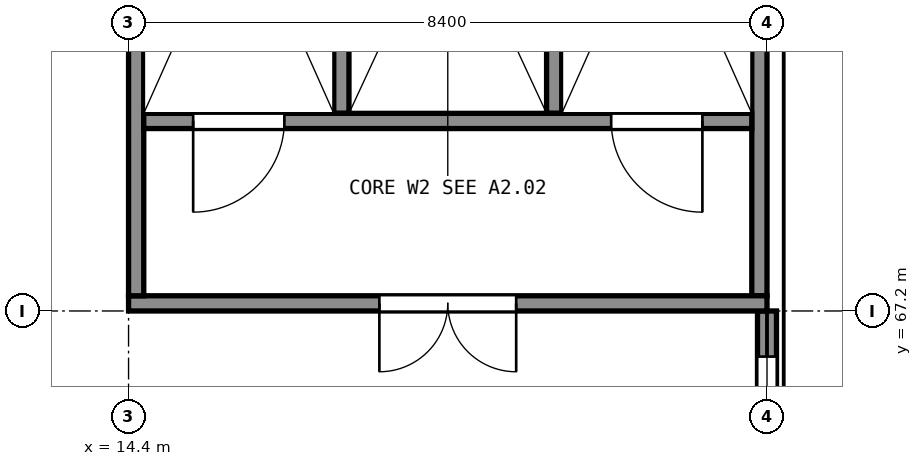
"""IFC4 building model, lengths in metres.
Left out: names, types, materials, properties, quantities, classifications, styles, units other than length and angle.
Written with IfcOpenShell. Run it as: python <this file> out.ifc"""

import sys

from ifc_helpers import new_model, si_unit, direction, frame, frame_2d, origin, place, context, subcontext, project, spatial, rectangle, extrude, element, fill, save


model = new_model("IFC4")
c1 = context("Model", 3, precision=1e-05, world=origin(), true_north=direction((0.0, 1.0)))
c2 = subcontext(c1, "Body", "Model", "MODEL_VIEW")
j1 = project(units=[si_unit("LENGTHUNIT", "METRE"), si_unit("PLANEANGLEUNIT", "RADIAN")], contexts=[c1])
p1 = place(None, origin())
s1 = spatial("IfcSite", under=j1, at=p1, CompositionType="ELEMENT")
p2 = place(p1, origin())
s2 = spatial("IfcBuilding", under=s1, at=p2, CompositionType="ELEMENT")
p3 = place(p2, frame((0.0, 0.0, 5.5)))
s3 = spatial("IfcBuildingStorey", under=s2, at=p3, CompositionType="ELEMENT", Elevation=5.5)
p4 = place(p3, frame((14.4, 67.3, 0.0), z_axis=(0.0, 0.0, 1.0), x_axis=(1.0, 0.0, 0.0)))
e1 = element("IfcWall", 1, at=p4, inside=s3, PredefinedType="SHEAR", context=c2, shape_type="SweptSolid", body=[
    extrude(rectangle(XDim=8.4, YDim=0.2, at=frame_2d((4.2, 0.0))), origin(), (0.0, 0.0, 1.0), 5.0),
])
p5 = place(p4, frame((3.3, 0.0, 0.0)))
e2 = element("IfcOpeningElement", 2, at=p5, cuts=e1, PredefinedType="OPENING", context=c2, shape_type="SweptSolid", body=[
    extrude(rectangle(XDim=1.8, YDim=2.1, at=frame_2d((0.9, 1.05))), frame((0.0, 0.11, 0.0), z_axis=(0.0, -1.0, 0.0), x_axis=(1.0, 0.0, 0.0)), (0.0, 0.0, 1.0), 0.22),
])
for number, where, z_axis, x_axis in (
    (3, (14.5, 67.4, 0.0), (0.0, 0.0, 1.0), (0.0, 1.0, 0.0)),
    (4, (22.7, 67.4, 0.0), (0.0, 0.0, 1.0), (0.0, 1.0, 0.0)),
):
    element("IfcWall", number, at=place(p3, frame(where, z_axis=z_axis, x_axis=x_axis)), inside=s3, PredefinedType="SHEAR", context=c2, shape_type="SweptSolid", body=[
        extrude(rectangle(XDim=8.0, YDim=0.2, at=frame_2d((4.0, 0.0))), origin(), (0.0, 0.0, 1.0), 5.0),
    ])
p6 = place(p3, frame((14.6, 69.7, 0.0), z_axis=(0.0, 0.0, 1.0), x_axis=(1.0, 0.0, 0.0)))
e5 = element("IfcWall", 5, at=p6, inside=s3, PredefinedType="SHEAR", context=c2, shape_type="SweptSolid", body=[
    extrude(rectangle(XDim=8.0, YDim=0.2, at=frame_2d((4.0, 0.0))), origin(), (0.0, 0.0, 1.0), 5.0),
])
p7 = place(p6, frame((0.65, 0.0, 0.0)))
e6 = element("IfcOpeningElement", 6, at=p7, cuts=e5, PredefinedType="OPENING", context=c2, shape_type="SweptSolid", body=[
    extrude(rectangle(XDim=1.2, YDim=2.1, at=frame_2d((0.6, 1.05))), frame((0.0, 0.11, 0.0), z_axis=(0.0, -1.0, 0.0), x_axis=(1.0, 0.0, 0.0)), (0.0, 0.0, 1.0), 0.22),
])
p8 = place(p6, frame((6.15, 0.0, 0.0)))
e7 = element("IfcOpeningElement", 7, at=p8, cuts=e5, PredefinedType="OPENING", context=c2, shape_type="SweptSolid", body=[
    extrude(rectangle(XDim=1.2, YDim=2.1, at=frame_2d((0.6, 1.05))), frame((0.0, 0.11, 0.0), z_axis=(0.0, -1.0, 0.0), x_axis=(1.0, 0.0, 0.0)), (0.0, 0.0, 1.0), 0.22),
])
for number, where, z_axis, x_axis in (
    (8, (17.2, 69.8, 0.0), (0.0, 0.0, 1.0), (0.0, 1.0, 0.0)),
    (9, (20.0, 69.8, 0.0), (0.0, 0.0, 1.0), (0.0, 1.0, 0.0)),
):
    element("IfcWall", number, at=place(p3, frame(where, z_axis=z_axis, x_axis=x_axis)), inside=s3, PredefinedType="SHEAR", context=c2, shape_type="SweptSolid", body=[
        extrude(rectangle(XDim=5.6, YDim=0.2, at=frame_2d((2.8, 0.0))), origin(), (0.0, 0.0, 1.0), 5.0),
    ])
p9 = place(p3, frame((22.8, 59.2, 0.0), z_axis=(0.0, 0.0, 1.0), x_axis=(0.0, 1.0, 0.0)))
e10 = element("IfcWall", 10, at=p9, inside=s3, PredefinedType="SOLIDWALL", context=c2, shape_type="SweptSolid", body=[
    extrude(rectangle(XDim=8.0, YDim=0.25, at=frame_2d((4.0, 0.0))), origin(), (0.0, 0.0, 1.0), 3.94),
])
p10 = place(p9, frame((0.6, 0.0, 0.9)))
e11 = element("IfcOpeningElement", 11, at=p10, cuts=e10, PredefinedType="OPENING", context=c2, shape_type="SweptSolid", body=[
    extrude(rectangle(XDim=1.2, YDim=2.1, at=frame_2d((0.6, 1.05))), frame((0.0, 0.135, 0.0), z_axis=(0.0, -1.0, 0.0), x_axis=(1.0, 0.0, 0.0)), (0.0, 0.0, 1.0), 0.27),
])
p11 = place(p9, frame((3.95, 0.0, 0.9)))
e12 = element("IfcOpeningElement", 12, at=p11, cuts=e10, PredefinedType="OPENING", context=c2, shape_type="SweptSolid", body=[
    extrude(rectangle(XDim=1.2, YDim=2.1, at=frame_2d((0.6, 1.05))), frame((0.0, 0.135, 0.0), z_axis=(0.0, -1.0, 0.0), x_axis=(1.0, 0.0, 0.0)), (0.0, 0.0, 1.0), 0.27),
])
p12 = place(p9, frame((6.2, 0.0, 0.9)))
e13 = element("IfcOpeningElement", 13, at=p12, cuts=e10, PredefinedType="OPENING", context=c2, shape_type="SweptSolid", body=[
    extrude(rectangle(XDim=1.2, YDim=2.1, at=frame_2d((0.6, 1.05))), frame((0.0, 0.135, 0.0), z_axis=(0.0, -1.0, 0.0), x_axis=(1.0, 0.0, 0.0)), (0.0, 0.0, 1.0), 0.27),
])
p13 = place(p12, origin())
e14 = element("IfcWindow", 14, at=p13, inside=s3, PartitioningType="SINGLE_PANEL", PredefinedType="WINDOW", context=c2, shape_type="SweptSolid", body=[
    extrude(rectangle(XDim=1.2, YDim=2.1, at=frame_2d((0.6, 1.05))), frame((0.0, 0.105, 0.0), z_axis=(0.0, -1.0, 0.0), x_axis=(1.0, 0.0, 0.0)), (0.0, 0.0, 1.0), 0.06),
])
fill(e13, e14)
p14 = place(p5, origin())
e15 = element("IfcDoor", 15, at=p14, inside=s3, OperationType="DOUBLE_DOOR_SINGLE_SWING", PredefinedType="DOOR", context=c2, shape_type="SweptSolid", body=[
    extrude(rectangle(XDim=1.8, YDim=2.1, at=frame_2d((0.9, 1.05))), frame((0.0, 0.025, 0.0), z_axis=(0.0, -1.0, 0.0), x_axis=(1.0, 0.0, 0.0)), (0.0, 0.0, 1.0), 0.05),
])
fill(e2, e15)
p15 = place(p7, origin())
e16 = element("IfcDoor", 16, at=p15, inside=s3, OperationType="SINGLE_SWING_LEFT", PredefinedType="DOOR", context=c2, shape_type="SweptSolid", body=[
    extrude(rectangle(XDim=1.2, YDim=2.1, at=frame_2d((0.6, 1.05))), frame((0.0, 0.025, 0.0), z_axis=(0.0, -1.0, 0.0), x_axis=(1.0, 0.0, 0.0)), (0.0, 0.0, 1.0), 0.05),
])
fill(e6, e16)
p16 = place(p8, origin())
e17 = element("IfcDoor", 17, at=p16, inside=s3, OperationType="SINGLE_SWING_RIGHT", PredefinedType="DOOR", context=c2, shape_type="SweptSolid", body=[
    extrude(rectangle(XDim=1.2, YDim=2.1, at=frame_2d((0.6, 1.05))), frame((0.0, 0.025, 0.0), z_axis=(0.0, -1.0, 0.0), x_axis=(1.0, 0.0, 0.0)), (0.0, 0.0, 1.0), 0.05),
])
fill(e7, e17)
save(model, sys.argv[1])
